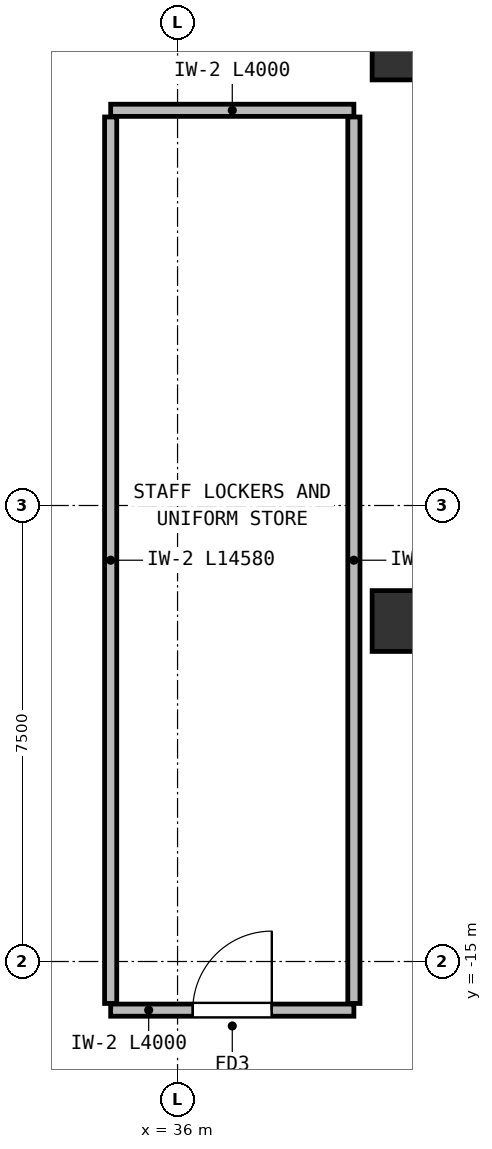
"""IFC4 building model, lengths in metres.
Left out: names, types, materials, properties, quantities, classifications, styles, units other than length and angle.
Written with IfcOpenShell. Run it as: python <this file> out.ifc"""

import sys

from ifc_helpers import new_model, si_unit, direction, frame, frame_2d, origin, origin_2d, place, context, subcontext, project, spatial, rectangle, extrude, element, fill, save


model = new_model("IFC4")
c1 = context("Model", 3, precision=1e-05, world=origin(), true_north=direction((0.0, 1.0)))
c2 = subcontext(c1, "Body", "Model", "MODEL_VIEW")
j1 = project(units=[si_unit("LENGTHUNIT", "METRE"), si_unit("PLANEANGLEUNIT", "RADIAN")], contexts=[c1])
p1 = place(None, origin())
s1 = spatial("IfcSite", under=j1, at=p1, CompositionType="ELEMENT")
p2 = place(p1, origin())
s2 = spatial("IfcBuilding", under=s1, at=p2, CompositionType="ELEMENT")
p3 = place(p2, frame((0.0, 0.0, -9.0)))
s3 = spatial("IfcBuildingStorey", under=s2, at=p3, CompositionType="ELEMENT", Elevation=-9.0)
for number, where, z_axis, x_axis in (
    (1, (39.6, -9.4, 0.0), (0.0, 0.0, 1.0), (1.0, 0.0, 0.0)),
    (2, (39.6, 0.0, 0.0), (0.0, 0.0, 1.0), (1.0, 0.0, 0.0)),
):
    element("IfcColumn", number, at=place(p3, frame(where, z_axis=z_axis, x_axis=x_axis)), inside=s3, PredefinedType="COLUMN", context=c2, shape_type="SweptSolid", body=[
        extrude(rectangle(XDim=0.8, YDim=1.0, at=origin_2d()), origin(), (0.0, 0.0, 1.0), 4.5),
    ])
p4 = place(p3, frame((34.9, -1.0, 0.0), z_axis=(0.0, 0.0, 1.0), x_axis=(1.0, 0.0, 0.0)))
e3 = element("IfcWall", 3, at=p4, inside=s3, PredefinedType="PARTITIONING", context=c2, shape_type="SweptSolid", body=[
    extrude(rectangle(XDim=4.0, YDim=0.2, at=frame_2d((2.0, 0.0))), origin(), (0.0, 0.0, 1.0), 4.2),
])
p5 = place(p3, frame((34.9, -15.8, 0.0), z_axis=(0.0, 0.0, 1.0), x_axis=(1.0, 0.0, 0.0)))
e4 = element("IfcWall", 4, at=p5, inside=s3, PredefinedType="PARTITIONING", context=c2, shape_type="SweptSolid", body=[
    extrude(rectangle(XDim=4.0, YDim=0.2, at=frame_2d((2.0, 0.0))), origin(), (0.0, 0.0, 1.0), 4.2),
])
p6 = place(p5, frame((1.35, 0.0, 0.0)))
e5 = element("IfcOpeningElement", 5, at=p6, cuts=e4, PredefinedType="OPENING", context=c2, shape_type="SweptSolid", body=[
    extrude(rectangle(XDim=1.3, YDim=2.15, at=frame_2d((0.65, 1.075))), frame((0.0, 0.11, 0.0), z_axis=(0.0, -1.0, 0.0), x_axis=(1.0, 0.0, 0.0)), (0.0, 0.0, 1.0), 0.22),
])
for number, where, z_axis, x_axis in (
    (6, (34.9, -1.11, 0.0), (0.0, 0.0, 1.0), (0.0, -1.0, 0.0)),
    (7, (38.9, -15.69, 0.0), (0.0, 0.0, 1.0), (0.0, 1.0, 0.0)),
):
    element("IfcWall", number, at=place(p3, frame(where, z_axis=z_axis, x_axis=x_axis)), inside=s3, PredefinedType="PARTITIONING", context=c2, shape_type="SweptSolid", body=[
        extrude(rectangle(XDim=14.58, YDim=0.2, at=frame_2d((7.29, 0.0))), origin(), (0.0, 0.0, 1.0), 4.2),
    ])
p7 = place(p6, origin())
e8 = element("IfcDoor", 8, at=p7, inside=s3, OperationType="SINGLE_SWING_RIGHT", PredefinedType="DOOR", context=c2, shape_type="SweptSolid", body=[
    extrude(rectangle(XDim=1.3, YDim=2.15, at=frame_2d((0.65, 1.075))), frame((0.0, 0.025, 0.0), z_axis=(0.0, -1.0, 0.0), x_axis=(1.0, 0.0, 0.0)), (0.0, 0.0, 1.0), 0.05),
])
fill(e5, e8)
save(model, sys.argv[1])
